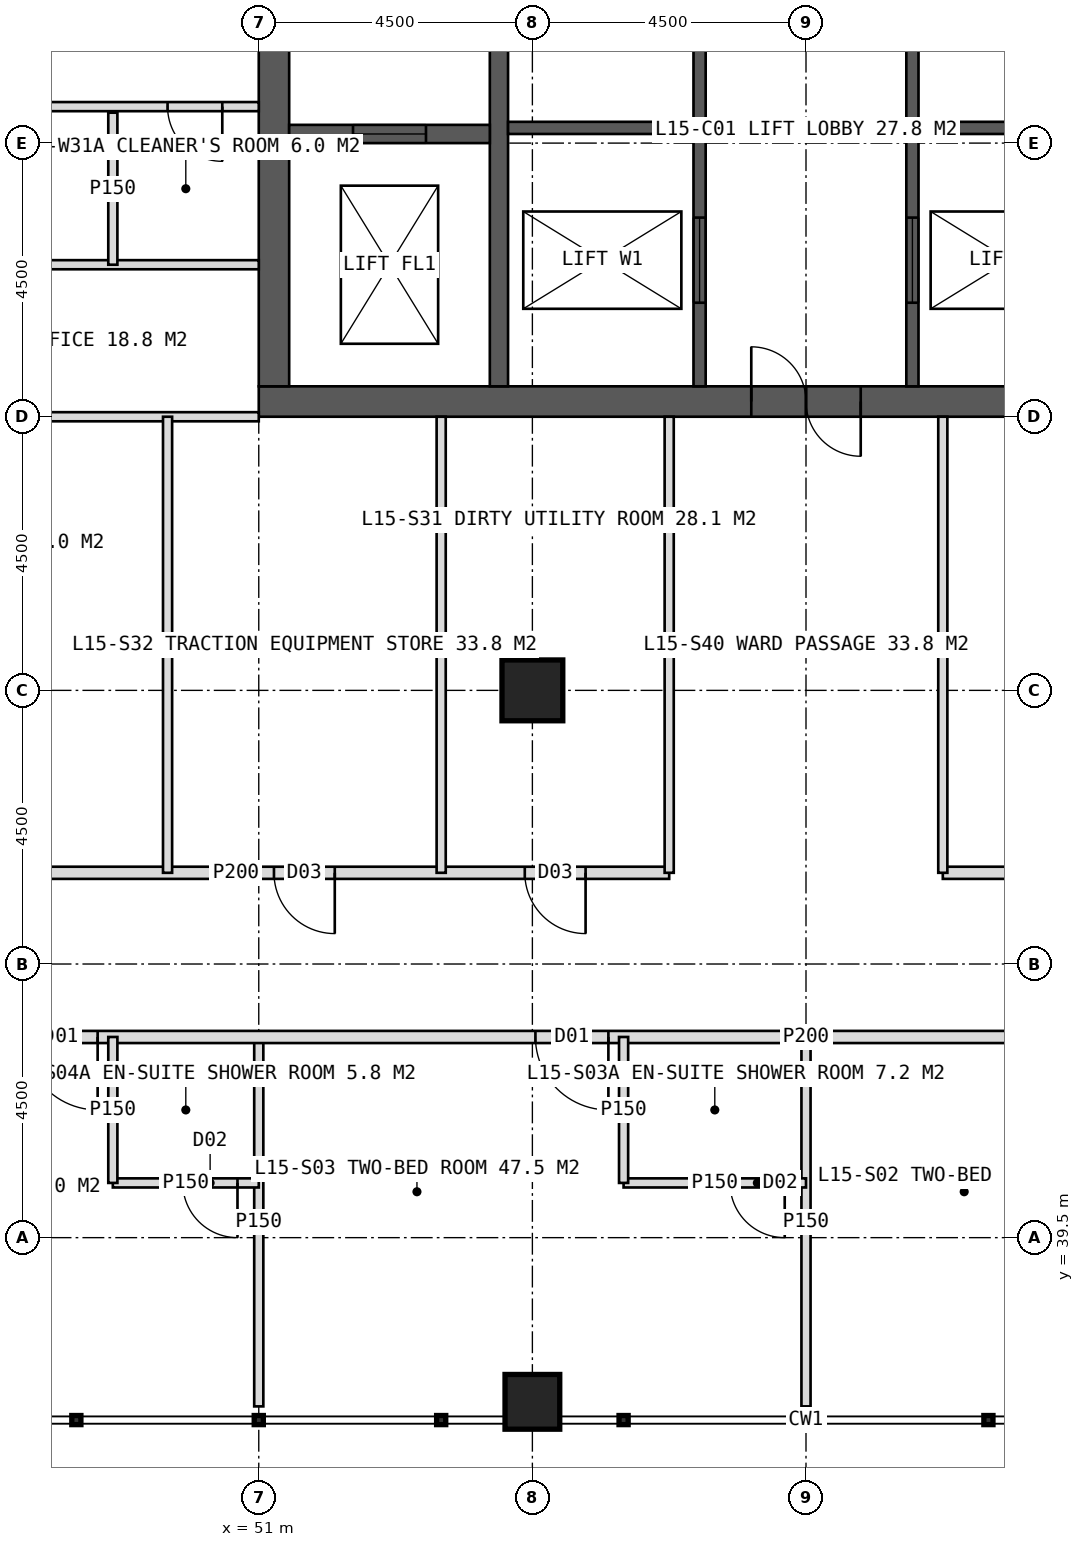
"""IFC4 building model, lengths in metres.
Left out: names, types, materials, properties, quantities, classifications, styles, units other than length and angle.
Written with IfcOpenShell. Run it as: python <this file> out.ifc"""

import sys

from ifc_helpers import new_model, si_unit, direction, frame, frame_2d, origin, origin_2d, place, context, subcontext, project, spatial, rectangle, hollow_rectangle, extrude, element, fill, save


model = new_model("IFC4")
c1 = context("Model", 3, precision=1e-05, world=origin(), true_north=direction((0.0, 1.0)))
c2 = subcontext(c1, "Body", "Model", "MODEL_VIEW")
j1 = project(units=[si_unit("LENGTHUNIT", "METRE"), si_unit("PLANEANGLEUNIT", "RADIAN")], contexts=[c1])
p1 = place(None, origin())
s1 = spatial("IfcSite", under=j1, at=p1, CompositionType="ELEMENT")
p2 = place(p1, origin())
s2 = spatial("IfcBuilding", under=s1, at=p2, CompositionType="ELEMENT")
p3 = place(p2, frame((0.0, 0.0, 67.0)))
s3 = spatial("IfcBuildingStorey", under=s2, at=p3, CompositionType="ELEMENT", Elevation=67.0)
p4 = place(p3, frame((51.0, 53.25, 0.0), z_axis=(0.0, 0.0, 1.0), x_axis=(1.0, 0.0, 0.0)))
e1 = element("IfcWall", 1, at=p4, inside=s3, PredefinedType="SHEAR", context=c2, shape_type="SweptSolid", body=[
    extrude(rectangle(XDim=18.0, YDim=0.5, at=frame_2d((9.0, 0.0))), origin(), (0.0, 0.0, 1.0), 4.0),
])
p5 = place(p4, frame((8.1, 0.0, 0.0)))
e2 = element("IfcOpeningElement", 2, at=p5, cuts=e1, PredefinedType="OPENING", context=c2, shape_type="SweptSolid", body=[
    extrude(rectangle(XDim=1.8, YDim=2.2, at=frame_2d((0.9, 1.1))), frame((0.0, 0.26, 0.0), z_axis=(0.0, -1.0, 0.0), x_axis=(1.0, 0.0, 0.0)), (0.0, 0.0, 1.0), 0.52),
])
p6 = place(p3, frame((51.25, 53.5, 0.0), z_axis=(0.0, 0.0, 1.0), x_axis=(0.0, 1.0, 0.0)))
e3 = element("IfcWall", 3, at=p6, inside=s3, PredefinedType="SHEAR", context=c2, shape_type="SweptSolid", body=[
    extrude(rectangle(XDim=17.0, YDim=0.5, at=frame_2d((8.5, 0.0))), origin(), (0.0, 0.0, 1.0), 4.0),
])
p7 = place(p6, frame((6.0, 0.0, 0.0)))
e4 = element("IfcOpeningElement", 4, at=p7, cuts=e3, PredefinedType="OPENING", context=c2, shape_type="SweptSolid", body=[
    extrude(rectangle(XDim=1.5, YDim=2.2, at=frame_2d((0.75, 1.1))), frame((0.0, 0.26, 0.0), z_axis=(0.0, -1.0, 0.0), x_axis=(1.0, 0.0, 0.0)), (0.0, 0.0, 1.0), 0.52),
])
p8 = place(p3, frame((54.95, 53.5, 0.0), z_axis=(0.0, 0.0, 1.0), x_axis=(0.0, 1.0, 0.0)))
e5 = element("IfcWall", 5, at=p8, inside=s3, PredefinedType="SHEAR", context=c2, shape_type="SweptSolid", body=[
    extrude(rectangle(XDim=17.0, YDim=0.3, at=frame_2d((8.5, 0.0))), origin(), (0.0, 0.0, 1.0), 4.0),
])
p9 = place(p3, frame((58.25, 53.5, 0.0), z_axis=(0.0, 0.0, 1.0), x_axis=(0.0, 1.0, 0.0)))
e6 = element("IfcWall", 6, at=p9, inside=s3, PredefinedType="SHEAR", context=c2, shape_type="SweptSolid", body=[
    extrude(rectangle(XDim=17.0, YDim=0.2, at=frame_2d((8.5, 0.0))), origin(), (0.0, 0.0, 1.0), 4.0),
])
p10 = place(p9, frame((1.375, 0.0, 0.0)))
e7 = element("IfcOpeningElement", 7, at=p10, cuts=e6, PredefinedType="OPENING", context=c2, shape_type="SweptSolid", body=[
    extrude(rectangle(XDim=1.4, YDim=2.2, at=frame_2d((0.7, 1.1))), frame((0.0, 0.11, 0.0), z_axis=(0.0, -1.0, 0.0), x_axis=(1.0, 0.0, 0.0)), (0.0, 0.0, 1.0), 0.22),
])
p11 = place(p9, frame((5.675, 0.0, 0.0)))
e8 = element("IfcOpeningElement", 8, at=p11, cuts=e6, PredefinedType="OPENING", context=c2, shape_type="SweptSolid", body=[
    extrude(rectangle(XDim=1.4, YDim=2.2, at=frame_2d((0.7, 1.1))), frame((0.0, 0.11, 0.0), z_axis=(0.0, -1.0, 0.0), x_axis=(1.0, 0.0, 0.0)), (0.0, 0.0, 1.0), 0.22),
])
p12 = place(p3, frame((61.75, 53.5, 0.0), z_axis=(0.0, 0.0, 1.0), x_axis=(0.0, 1.0, 0.0)))
e9 = element("IfcWall", 9, at=p12, inside=s3, PredefinedType="SHEAR", context=c2, shape_type="SweptSolid", body=[
    extrude(rectangle(XDim=17.0, YDim=0.2, at=frame_2d((8.5, 0.0))), origin(), (0.0, 0.0, 1.0), 4.0),
])
p13 = place(p12, frame((1.375, 0.0, 0.0)))
e10 = element("IfcOpeningElement", 10, at=p13, cuts=e9, PredefinedType="OPENING", context=c2, shape_type="SweptSolid", body=[
    extrude(rectangle(XDim=1.4, YDim=2.2, at=frame_2d((0.7, 1.1))), frame((0.0, 0.11, 0.0), z_axis=(0.0, -1.0, 0.0), x_axis=(1.0, 0.0, 0.0)), (0.0, 0.0, 1.0), 0.22),
])
p14 = place(p12, frame((5.675, 0.0, 0.0)))
e11 = element("IfcOpeningElement", 11, at=p14, cuts=e9, PredefinedType="OPENING", context=c2, shape_type="SweptSolid", body=[
    extrude(rectangle(XDim=1.4, YDim=2.2, at=frame_2d((0.7, 1.1))), frame((0.0, 0.11, 0.0), z_axis=(0.0, -1.0, 0.0), x_axis=(1.0, 0.0, 0.0)), (0.0, 0.0, 1.0), 0.22),
])
for number, where, z_axis, x_axis in (
    (12, (55.1, 57.75, 0.0), (0.0, 0.0, 1.0), (1.0, 0.0, 0.0)),
    (13, (61.85, 57.75, 0.0), (0.0, 0.0, 1.0), (1.0, 0.0, 0.0)),
):
    element("IfcWall", number, at=place(p3, frame(where, z_axis=z_axis, x_axis=x_axis)), inside=s3, PredefinedType="SHEAR", context=c2, shape_type="SweptSolid", body=[
        extrude(rectangle(XDim=3.05, YDim=0.2, at=frame_2d((1.525, 0.0))), origin(), (0.0, 0.0, 1.0), 4.0),
    ])
p15 = place(p3, frame((51.5, 57.65, 0.0), z_axis=(0.0, 0.0, 1.0), x_axis=(1.0, 0.0, 0.0)))
e14 = element("IfcWall", 14, at=p15, inside=s3, PredefinedType="SHEAR", context=c2, shape_type="SweptSolid", body=[
    extrude(rectangle(XDim=3.3, YDim=0.3, at=frame_2d((1.65, 0.0))), origin(), (0.0, 0.0, 1.0), 4.0),
])
p16 = place(p15, frame((1.05, 0.0, 0.0)))
e15 = element("IfcOpeningElement", 15, at=p16, cuts=e14, PredefinedType="OPENING", context=c2, shape_type="SweptSolid", body=[
    extrude(rectangle(XDim=1.2, YDim=2.2, at=frame_2d((0.6, 1.1))), frame((0.0, 0.16, 0.0), z_axis=(0.0, -1.0, 0.0), x_axis=(1.0, 0.0, 0.0)), (0.0, 0.0, 1.0), 0.32),
])
p17 = place(p3, frame((55.5, 48.5, 0.0), z_axis=(0.0, 0.0, 1.0), x_axis=(1.0, 0.0, 0.0)))
e16 = element("IfcColumn", 16, at=p17, inside=s3, PredefinedType="COLUMN", context=c2, shape_type="SweptSolid", body=[
    extrude(hollow_rectangle(XDim=1.0, YDim=1.0, WallThickness=0.1, at=origin_2d()), origin(), (0.0, 0.0, 1.0), 4.0),
])
p18 = place(p3, frame((55.5, 36.8, 0.0), z_axis=(0.0, 0.0, 1.0), x_axis=(1.0, 0.0, 0.0)))
e17 = element("IfcColumn", 17, at=p18, inside=s3, PredefinedType="COLUMN", context=c2, shape_type="SweptSolid", body=[
    extrude(hollow_rectangle(XDim=0.9, YDim=0.9, WallThickness=0.08, at=origin_2d()), origin(), (0.0, 0.0, 1.0), 4.0),
])
p19 = place(p3, frame((51.0, 53.0, 0.0), z_axis=(0.0, 0.0, 1.0), x_axis=(-1.0, 0.0, 0.0)))
e18 = element("IfcWall", 18, at=p19, inside=s3, PredefinedType="PARTITIONING", context=c2, shape_type="SweptSolid", body=[
    extrude(rectangle(XDim=7.5, YDim=0.15, at=frame_2d((3.75, 0.0))), origin(), (0.0, 0.0, 1.0), 3.75),
])
p20 = place(p3, frame((51.0, 58.1, 0.0), z_axis=(0.0, 0.0, 1.0), x_axis=(-1.0, 0.0, 0.0)))
e19 = element("IfcWall", 19, at=p20, inside=s3, PredefinedType="PARTITIONING", context=c2, shape_type="SweptSolid", body=[
    extrude(rectangle(XDim=7.5, YDim=0.15, at=frame_2d((3.75, 0.0))), origin(), (0.0, 0.0, 1.0), 3.75),
])
p21 = place(p20, frame((0.6, 0.0, 0.0)))
e20 = element("IfcOpeningElement", 20, at=p21, cuts=e19, PredefinedType="OPENING", context=c2, shape_type="SweptSolid", body=[
    extrude(rectangle(XDim=0.9, YDim=2.1, at=frame_2d((0.45, 1.05))), frame((0.0, 0.085, 0.0), z_axis=(0.0, -1.0, 0.0), x_axis=(1.0, 0.0, 0.0)), (0.0, 0.0, 1.0), 0.17),
])
p22 = place(p3, frame((51.0, 55.5, 0.0), z_axis=(0.0, 0.0, 1.0), x_axis=(-1.0, 0.0, 0.0)))
e21 = element("IfcWall", 21, at=p22, inside=s3, PredefinedType="PARTITIONING", context=c2, shape_type="SweptSolid", body=[
    extrude(rectangle(XDim=7.5, YDim=0.15, at=frame_2d((3.75, 0.0))), origin(), (0.0, 0.0, 1.0), 3.75),
])
p23 = place(p3, frame((48.6, 55.5, 0.0), z_axis=(0.0, 0.0, 1.0), x_axis=(0.0, 1.0, 0.0)))
e22 = element("IfcWall", 22, at=p23, inside=s3, PredefinedType="PARTITIONING", context=c2, shape_type="SweptSolid", body=[
    extrude(rectangle(XDim=2.5, YDim=0.15, at=frame_2d((1.25, 0.0))), origin(), (0.0, 0.0, 1.0), 3.75),
])
p24 = place(p3, frame((60.0, 42.8, 0.0), z_axis=(0.0, 0.0, 1.0), x_axis=(0.0, -1.0, 0.0)))
e23 = element("IfcWall", 23, at=p24, inside=s3, PredefinedType="PARTITIONING", context=c2, shape_type="SweptSolid", body=[
    extrude(rectangle(XDim=6.075, YDim=0.15, at=frame_2d((3.038, 0.0))), origin(), (0.0, 0.0, 1.0), 2.75),
])
p25 = place(p3, frame((51.0, 42.8, 0.0), z_axis=(0.0, 0.0, 1.0), x_axis=(0.0, -1.0, 0.0)))
e24 = element("IfcWall", 24, at=p25, inside=s3, PredefinedType="PARTITIONING", context=c2, shape_type="SweptSolid", body=[
    extrude(rectangle(XDim=6.075, YDim=0.15, at=frame_2d((3.038, 0.0))), origin(), (0.0, 0.0, 1.0), 3.75),
])
p26 = place(p3, frame((79.2, 42.8, 0.0), z_axis=(0.0, 0.0, 1.0), x_axis=(-1.0, 0.0, 0.0)))
e25 = element("IfcWall", 25, at=p26, inside=s3, PredefinedType="PARTITIONING", context=c2, shape_type="SweptSolid", body=[
    extrude(rectangle(XDim=38.4, YDim=0.2, at=frame_2d((19.2, 0.0))), origin(), (0.0, 0.0, 1.0), 3.75),
])
p27 = place(p26, frame((3.25, 0.0, 0.0)))
e26 = element("IfcOpeningElement", 26, at=p27, cuts=e25, PredefinedType="OPENING", context=c2, shape_type="SweptSolid", body=[
    extrude(rectangle(XDim=1.2, YDim=2.2, at=frame_2d((0.6, 1.1))), frame((0.0, 0.11, 0.0), z_axis=(0.0, -1.0, 0.0), x_axis=(1.0, 0.0, 0.0)), (0.0, 0.0, 1.0), 0.22),
])
p28 = place(p26, frame((13.45, 0.0, 0.0)))
e27 = element("IfcOpeningElement", 27, at=p28, cuts=e25, PredefinedType="OPENING", context=c2, shape_type="SweptSolid", body=[
    extrude(rectangle(XDim=1.2, YDim=2.2, at=frame_2d((0.6, 1.1))), frame((0.0, 0.11, 0.0), z_axis=(0.0, -1.0, 0.0), x_axis=(1.0, 0.0, 0.0)), (0.0, 0.0, 1.0), 0.22),
])
p29 = place(p26, frame((22.45, 0.0, 0.0)))
e28 = element("IfcOpeningElement", 28, at=p29, cuts=e25, PredefinedType="OPENING", context=c2, shape_type="SweptSolid", body=[
    extrude(rectangle(XDim=1.2, YDim=2.2, at=frame_2d((0.6, 1.1))), frame((0.0, 0.11, 0.0), z_axis=(0.0, -1.0, 0.0), x_axis=(1.0, 0.0, 0.0)), (0.0, 0.0, 1.0), 0.22),
])
p30 = place(p26, frame((30.85, 0.0, 0.0)))
e29 = element("IfcOpeningElement", 29, at=p30, cuts=e25, PredefinedType="OPENING", context=c2, shape_type="SweptSolid", body=[
    extrude(rectangle(XDim=1.2, YDim=2.2, at=frame_2d((0.6, 1.1))), frame((0.0, 0.11, 0.0), z_axis=(0.0, -1.0, 0.0), x_axis=(1.0, 0.0, 0.0)), (0.0, 0.0, 1.0), 0.22),
])
p31 = place(p3, frame((60.0, 40.4, 0.0), z_axis=(0.0, 0.0, 1.0), x_axis=(-1.0, 0.0, 0.0)))
e30 = element("IfcWall", 30, at=p31, inside=s3, PredefinedType="PARTITIONING", context=c2, shape_type="SweptSolid", body=[
    extrude(rectangle(XDim=3.0, YDim=0.15, at=frame_2d((1.5, 0.0))), origin(), (0.0, 0.0, 1.0), 3.75),
])
p32 = place(p31, frame((0.35, 0.0, 0.0)))
e31 = element("IfcOpeningElement", 31, at=p32, cuts=e30, PredefinedType="OPENING", context=c2, shape_type="SweptSolid", body=[
    extrude(rectangle(XDim=0.9, YDim=2.1, at=frame_2d((0.45, 1.05))), frame((0.0, 0.085, 0.0), z_axis=(0.0, -1.0, 0.0), x_axis=(1.0, 0.0, 0.0)), (0.0, 0.0, 1.0), 0.17),
])
p33 = place(p3, frame((57.0, 42.8, 0.0), z_axis=(0.0, 0.0, 1.0), x_axis=(0.0, -1.0, 0.0)))
e32 = element("IfcWall", 32, at=p33, inside=s3, PredefinedType="PARTITIONING", context=c2, shape_type="SweptSolid", body=[
    extrude(rectangle(XDim=2.4, YDim=0.15, at=frame_2d((1.2, 0.0))), origin(), (0.0, 0.0, 1.0), 3.75),
])
p34 = place(p3, frame((51.0, 40.4, 0.0), z_axis=(0.0, 0.0, 1.0), x_axis=(-1.0, 0.0, 0.0)))
e33 = element("IfcWall", 33, at=p34, inside=s3, PredefinedType="PARTITIONING", context=c2, shape_type="SweptSolid", body=[
    extrude(rectangle(XDim=2.4, YDim=0.15, at=frame_2d((1.2, 0.0))), origin(), (0.0, 0.0, 1.0), 3.75),
])
p35 = place(p34, frame((0.35, 0.0, 0.0)))
e34 = element("IfcOpeningElement", 34, at=p35, cuts=e33, PredefinedType="OPENING", context=c2, shape_type="SweptSolid", body=[
    extrude(rectangle(XDim=0.9, YDim=2.1, at=frame_2d((0.45, 1.05))), frame((0.0, 0.085, 0.0), z_axis=(0.0, -1.0, 0.0), x_axis=(1.0, 0.0, 0.0)), (0.0, 0.0, 1.0), 0.17),
])
p36 = place(p3, frame((48.6, 42.8, 0.0), z_axis=(0.0, 0.0, 1.0), x_axis=(0.0, -1.0, 0.0)))
e35 = element("IfcWall", 35, at=p36, inside=s3, PredefinedType="PARTITIONING", context=c2, shape_type="SweptSolid", body=[
    extrude(rectangle(XDim=2.4, YDim=0.15, at=frame_2d((1.2, 0.0))), origin(), (0.0, 0.0, 1.0), 3.75),
])
p37 = place(p3, frame((76.5, 45.5, 0.0), z_axis=(0.0, 0.0, 1.0), x_axis=(-1.0, 0.0, 0.0)))
e36 = element("IfcWall", 36, at=p37, inside=s3, PredefinedType="PARTITIONING", context=c2, shape_type="SweptSolid", body=[
    extrude(rectangle(XDim=14.25, YDim=0.2, at=frame_2d((7.125, 0.0))), origin(), (0.0, 0.0, 1.0), 3.75),
])
p38 = place(p37, frame((10.375, 0.0, 0.0)))
e37 = element("IfcOpeningElement", 37, at=p38, cuts=e36, PredefinedType="OPENING", context=c2, shape_type="SweptSolid", body=[
    extrude(rectangle(XDim=1.0, YDim=2.1, at=frame_2d((0.5, 1.05))), frame((0.0, 0.11, 0.0), z_axis=(0.0, -1.0, 0.0), x_axis=(1.0, 0.0, 0.0)), (0.0, 0.0, 1.0), 0.22),
])
p39 = place(p3, frame((57.75, 45.5, 0.0), z_axis=(0.0, 0.0, 1.0), x_axis=(-1.0, 0.0, 0.0)))
e38 = element("IfcWall", 38, at=p39, inside=s3, PredefinedType="PARTITIONING", context=c2, shape_type="SweptSolid", body=[
    extrude(rectangle(XDim=14.25, YDim=0.2, at=frame_2d((7.125, 0.0))), origin(), (0.0, 0.0, 1.0), 3.75),
])
p40 = place(p39, frame((1.375, 0.0, 0.0)))
e39 = element("IfcOpeningElement", 39, at=p40, cuts=e38, PredefinedType="OPENING", context=c2, shape_type="SweptSolid", body=[
    extrude(rectangle(XDim=1.0, YDim=2.1, at=frame_2d((0.5, 1.05))), frame((0.0, 0.11, 0.0), z_axis=(0.0, -1.0, 0.0), x_axis=(1.0, 0.0, 0.0)), (0.0, 0.0, 1.0), 0.22),
])
p41 = place(p39, frame((5.5, 0.0, 0.0)))
e40 = element("IfcOpeningElement", 40, at=p41, cuts=e38, PredefinedType="OPENING", context=c2, shape_type="SweptSolid", body=[
    extrude(rectangle(XDim=1.0, YDim=2.1, at=frame_2d((0.5, 1.05))), frame((0.0, 0.11, 0.0), z_axis=(0.0, -1.0, 0.0), x_axis=(1.0, 0.0, 0.0)), (0.0, 0.0, 1.0), 0.22),
])
p42 = place(p39, frame((10.75, 0.0, 0.0)))
e41 = element("IfcOpeningElement", 41, at=p42, cuts=e38, PredefinedType="OPENING", context=c2, shape_type="SweptSolid", body=[
    extrude(rectangle(XDim=1.0, YDim=2.1, at=frame_2d((0.5, 1.05))), frame((0.0, 0.11, 0.0), z_axis=(0.0, -1.0, 0.0), x_axis=(1.0, 0.0, 0.0)), (0.0, 0.0, 1.0), 0.22),
])
for number, where, z_axis, x_axis in (
    (42, (62.25, 53.0, 0.0), (0.0, 0.0, 1.0), (0.0, -1.0, 0.0)),
    (43, (57.75, 53.0, 0.0), (0.0, 0.0, 1.0), (0.0, -1.0, 0.0)),
    (44, (54.0, 53.0, 0.0), (0.0, 0.0, 1.0), (0.0, -1.0, 0.0)),
    (45, (49.5, 53.0, 0.0), (0.0, 0.0, 1.0), (0.0, -1.0, 0.0)),
):
    element("IfcWall", number, at=place(p3, frame(where, z_axis=z_axis, x_axis=x_axis)), inside=s3, PredefinedType="PARTITIONING", context=c2, shape_type="SweptSolid", body=[
        extrude(rectangle(XDim=7.5, YDim=0.15, at=frame_2d((3.75, 0.0))), origin(), (0.0, 0.0, 1.0), 3.75),
    ])
p43 = place(p21, origin())
e46 = element("IfcDoor", 46, at=p43, inside=s3, OperationType="SINGLE_SWING_LEFT", PredefinedType="DOOR", context=c2, shape_type="SweptSolid", body=[
    extrude(rectangle(XDim=0.9, YDim=2.1, at=frame_2d((0.45, 1.05))), frame((0.0, 0.025, 0.0), z_axis=(0.0, -1.0, 0.0), x_axis=(1.0, 0.0, 0.0)), (0.0, 0.0, 1.0), 0.05),
])
fill(e20, e46)
p44 = place(p29, origin())
e47 = element("IfcDoor", 47, at=p44, inside=s3, OperationType="SINGLE_SWING_LEFT", PredefinedType="DOOR", context=c2, shape_type="SweptSolid", body=[
    extrude(rectangle(XDim=1.2, YDim=2.2, at=frame_2d((0.6, 1.1))), frame((0.0, 0.025, 0.0), z_axis=(0.0, -1.0, 0.0), x_axis=(1.0, 0.0, 0.0)), (0.0, 0.0, 1.0), 0.05),
])
fill(e28, e47)
p45 = place(p32, origin())
e48 = element("IfcDoor", 48, at=p45, inside=s3, OperationType="SINGLE_SWING_LEFT", PredefinedType="DOOR", context=c2, shape_type="SweptSolid", body=[
    extrude(rectangle(XDim=0.9, YDim=2.1, at=frame_2d((0.45, 1.05))), frame((0.0, 0.025, 0.0), z_axis=(0.0, -1.0, 0.0), x_axis=(1.0, 0.0, 0.0)), (0.0, 0.0, 1.0), 0.05),
])
fill(e31, e48)
p46 = place(p30, origin())
e49 = element("IfcDoor", 49, at=p46, inside=s3, OperationType="SINGLE_SWING_LEFT", PredefinedType="DOOR", context=c2, shape_type="SweptSolid", body=[
    extrude(rectangle(XDim=1.2, YDim=2.2, at=frame_2d((0.6, 1.1))), frame((0.0, 0.025, 0.0), z_axis=(0.0, -1.0, 0.0), x_axis=(1.0, 0.0, 0.0)), (0.0, 0.0, 1.0), 0.05),
])
fill(e29, e49)
p47 = place(p35, origin())
e50 = element("IfcDoor", 50, at=p47, inside=s3, OperationType="SINGLE_SWING_LEFT", PredefinedType="DOOR", context=c2, shape_type="SweptSolid", body=[
    extrude(rectangle(XDim=0.9, YDim=2.1, at=frame_2d((0.45, 1.05))), frame((0.0, 0.025, 0.0), z_axis=(0.0, -1.0, 0.0), x_axis=(1.0, 0.0, 0.0)), (0.0, 0.0, 1.0), 0.05),
])
fill(e34, e50)
p48 = place(p40, origin())
e51 = element("IfcDoor", 51, at=p48, inside=s3, OperationType="SINGLE_SWING_LEFT", PredefinedType="DOOR", context=c2, shape_type="SweptSolid", body=[
    extrude(rectangle(XDim=1.0, YDim=2.1, at=frame_2d((0.5, 1.05))), frame((0.0, 0.025, 0.0), z_axis=(0.0, -1.0, 0.0), x_axis=(1.0, 0.0, 0.0)), (0.0, 0.0, 1.0), 0.05),
])
fill(e39, e51)
p49 = place(p41, origin())
e52 = element("IfcDoor", 52, at=p49, inside=s3, OperationType="SINGLE_SWING_LEFT", PredefinedType="DOOR", context=c2, shape_type="SweptSolid", body=[
    extrude(rectangle(XDim=1.0, YDim=2.1, at=frame_2d((0.5, 1.05))), frame((0.0, 0.025, 0.0), z_axis=(0.0, -1.0, 0.0), x_axis=(1.0, 0.0, 0.0)), (0.0, 0.0, 1.0), 0.05),
])
fill(e40, e52)
p50 = place(p5, origin())
e53 = element("IfcDoor", 53, at=p50, inside=s3, OperationType="DOUBLE_DOOR_SINGLE_SWING", PredefinedType="DOOR", context=c2, shape_type="SweptSolid", body=[
    extrude(rectangle(XDim=1.8, YDim=2.2, at=frame_2d((0.9, 1.1))), frame((0.0, 0.025, 0.0), z_axis=(0.0, -1.0, 0.0), x_axis=(1.0, 0.0, 0.0)), (0.0, 0.0, 1.0), 0.05),
])
fill(e2, e53)
p51 = place(p16, origin())
e54 = element("IfcDoor", 54, at=p51, inside=s3, OperationType="SLIDING_TO_LEFT", PredefinedType="DOOR", context=c2, shape_type="SweptSolid", body=[
    extrude(rectangle(XDim=1.2, YDim=2.2, at=frame_2d((0.6, 1.1))), frame((0.0, 0.025, 0.0), z_axis=(0.0, -1.0, 0.0), x_axis=(1.0, 0.0, 0.0)), (0.0, 0.0, 1.0), 0.05),
])
fill(e15, e54)
p52 = place(p10, origin())
e55 = element("IfcDoor", 55, at=p52, inside=s3, OperationType="SLIDING_TO_LEFT", PredefinedType="DOOR", context=c2, shape_type="SweptSolid", body=[
    extrude(rectangle(XDim=1.4, YDim=2.2, at=frame_2d((0.7, 1.1))), frame((0.0, 0.025, 0.0), z_axis=(0.0, -1.0, 0.0), x_axis=(1.0, 0.0, 0.0)), (0.0, 0.0, 1.0), 0.05),
])
fill(e7, e55)
p53 = place(p13, origin())
e56 = element("IfcDoor", 56, at=p53, inside=s3, OperationType="SLIDING_TO_LEFT", PredefinedType="DOOR", context=c2, shape_type="SweptSolid", body=[
    extrude(rectangle(XDim=1.4, YDim=2.2, at=frame_2d((0.7, 1.1))), frame((0.0, 0.025, 0.0), z_axis=(0.0, -1.0, 0.0), x_axis=(1.0, 0.0, 0.0)), (0.0, 0.0, 1.0), 0.05),
])
fill(e10, e56)
save(model, sys.argv[1])
